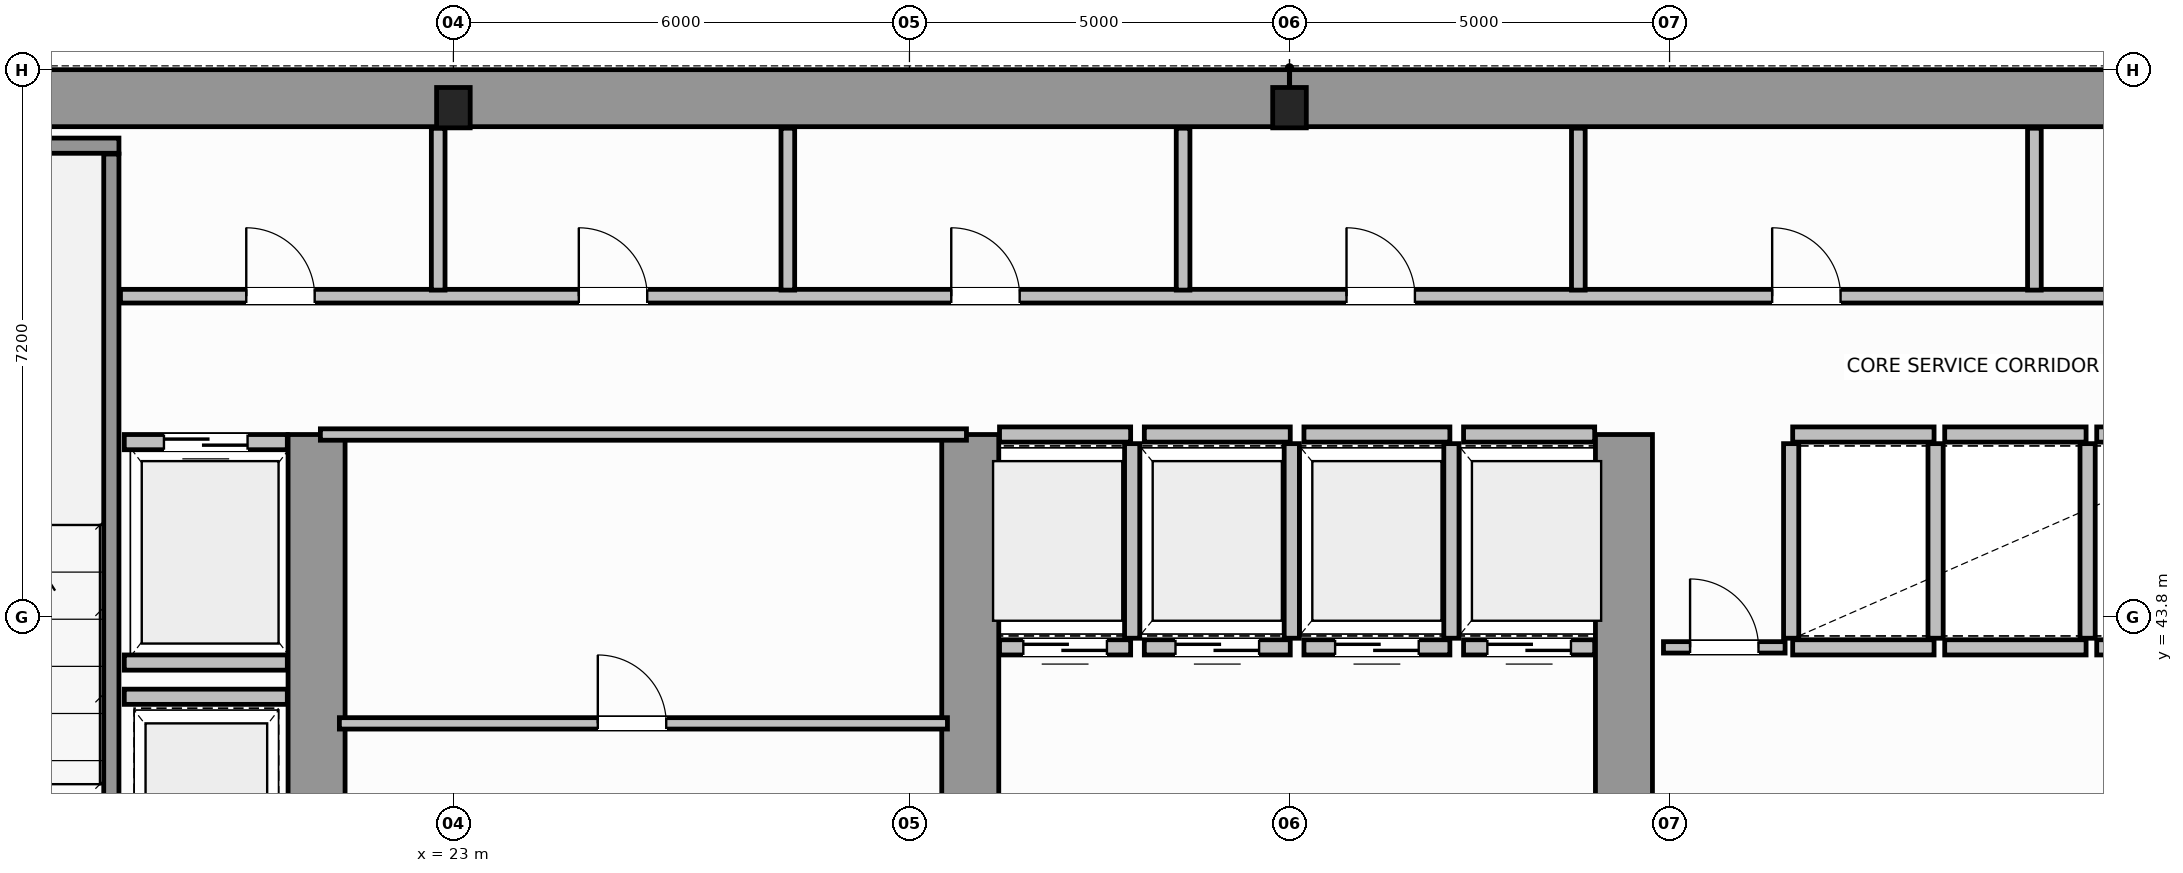
"""IFC4 building model, lengths in metres.
Left out: names, types, materials, properties, quantities, classifications, styles, units other than length and angle.
Written with IfcOpenShell. Run it as: python <this file> out.ifc"""

import sys

from ifc_helpers import new_model, si_unit, direction, frame, frame_2d, origin, origin_2d, place, context, subcontext, project, spatial, rectangle, i_section, extrude, source, transform, mapped, element, fill, save


model = new_model("IFC4")
c1 = context("Model", 3, precision=1e-05, world=origin(), true_north=direction((0.0, 1.0)))
c2 = subcontext(c1, "Body", "Model", "MODEL_VIEW")
j1 = project(units=[si_unit("LENGTHUNIT", "METRE"), si_unit("PLANEANGLEUNIT", "RADIAN")], contexts=[c1])
p1 = place(None, origin())
s1 = spatial("IfcSite", under=j1, at=p1, CompositionType="ELEMENT")
p2 = place(p1, origin())
s2 = spatial("IfcBuilding", under=s1, at=p2, CompositionType="ELEMENT")
p3 = place(p2, frame((0.0, 0.0, 126.2)))
s3 = spatial("IfcBuildingStorey", under=s2, at=p3, CompositionType="ELEMENT", Elevation=126.2)
m1 = source(origin(), c2, "Body", "SweptSolid", [
    extrude(i_section(OverallWidth=0.442, OverallDepth=0.531, WebThickness=0.065, FlangeThickness=0.076, FilletRadius=0.015, at=origin_2d()), origin(), (0.0, 0.0, 1.0), 3.8),
])
for number, where, z_axis, x_axis in (
    (1, (23.0, 50.5, 0.0), (0.0, 0.0, 1.0), (1.0, 0.0, 0.0)),
    (2, (34.0, 50.5, 0.0), (0.0, 0.0, 1.0), (1.0, 0.0, 0.0)),
):
    element("IfcColumn", number, at=place(p3, frame(where, z_axis=z_axis, x_axis=x_axis)), inside=s3, PredefinedType="COLUMN", context=c2, shape_type="MappedRepresentation", body=[
        mapped(m1, transform((0.0, 0.0, 0.0), scale=1.0)),
    ])
for number, where, z_axis, x_axis in (
    (3, (14.379, 50.625, 0.0), (0.0, 0.0, 1.0), (1.0, 0.0, 0.0)),
    (4, (34.002, 50.625, 0.0), (0.0, 0.0, 1.0), (1.0, 0.0, 0.0)),
):
    element("IfcWall", number, at=place(p3, frame(where, z_axis=z_axis, x_axis=x_axis)), inside=s3, PredefinedType="SHEAR", context=c2, shape_type="SweptSolid", body=[
        extrude(rectangle(XDim=19.619, YDim=0.75, at=frame_2d((9.81, 0.0))), origin(), (0.0, 0.0, 1.0), 3.8),
    ])
for number, where, z_axis, x_axis in (
    (5, (21.2, 36.895, 0.0), (0.0, 0.0, 1.0), (0.0, 1.0, 0.0)),
    (6, (29.8, 36.895, 0.0), (0.0, 0.0, 1.0), (0.0, 1.0, 0.0)),
    (7, (38.4, 36.895, 0.0), (0.0, 0.0, 1.0), (0.0, 1.0, 0.0)),
):
    element("IfcWall", number, at=place(p3, frame(where, z_axis=z_axis, x_axis=x_axis)), inside=s3, PredefinedType="SHEAR", context=c2, shape_type="SweptSolid", body=[
        extrude(rectangle(XDim=9.305, YDim=0.75, at=frame_2d((4.652, 0.0))), origin(), (0.0, 0.0, 1.0), 3.8),
    ])
p4 = place(p3, frame((14.375, 50.0, 0.0), z_axis=(0.0, 0.0, 1.0), x_axis=(1.0, 0.0, 0.0)))
e8 = element("IfcWall", 8, at=p4, inside=s3, PredefinedType="SOLIDWALL", context=c2, shape_type="SweptSolid", body=[
    extrude(rectangle(XDim=4.225, YDim=0.2, at=frame_2d((2.113, 0.0))), origin(), (0.0, 0.0, 1.0), 3.8),
])
p5 = place(p3, frame((18.5, 39.96, 0.0), z_axis=(0.0, 0.0, 1.0), x_axis=(0.0, 1.0, 0.0)))
e9 = element("IfcWall", 9, at=p5, inside=s3, PredefinedType="SOLIDWALL", context=c2, shape_type="SweptSolid", body=[
    extrude(rectangle(XDim=9.93, YDim=0.2, at=frame_2d((4.965, 0.0))), origin(), (0.0, 0.0, 1.0), 3.8),
])
p6 = place(p3, frame((30.185, 43.4, 0.0), z_axis=(0.0, 0.0, 1.0), x_axis=(1.0, 0.0, 0.0)))
e10 = element("IfcWall", 10, at=p6, inside=s3, PredefinedType="SOLIDWALL", context=c2, shape_type="SweptSolid", body=[
    extrude(rectangle(XDim=1.725, YDim=0.2, at=frame_2d((0.862, 0.0))), origin(), (0.0, 0.0, 1.0), 3.58),
])
p7 = place(p6, frame((0.313, 0.0, 0.0)))
e11 = element("IfcOpeningElement", 11, at=p7, cuts=e10, PredefinedType="OPENING", context=c2, shape_type="SweptSolid", body=[
    extrude(rectangle(XDim=1.1, YDim=2.15, at=frame_2d((0.55, 1.075))), frame((0.0, 0.11, 0.0), z_axis=(0.0, -1.0, 0.0), x_axis=(1.0, 0.0, 0.0)), (0.0, 0.0, 1.0), 0.22),
])
p8 = place(p3, frame((30.185, 46.2, 0.0), z_axis=(0.0, 0.0, 1.0), x_axis=(1.0, 0.0, 0.0)))
e12 = element("IfcWall", 12, at=p8, inside=s3, PredefinedType="SOLIDWALL", context=c2, shape_type="SweptSolid", body=[
    extrude(rectangle(XDim=1.725, YDim=0.2, at=frame_2d((0.862, 0.0))), origin(), (0.0, 0.0, 1.0), 3.58),
])
p9 = place(p3, frame((31.93, 43.52, 0.0), z_axis=(0.0, 0.0, 1.0), x_axis=(0.0, 1.0, 0.0)))
e13 = element("IfcWall", 13, at=p9, inside=s3, PredefinedType="SOLIDWALL", context=c2, shape_type="SweptSolid", body=[
    extrude(rectangle(XDim=2.56, YDim=0.2, at=frame_2d((1.28, 0.0))), origin(), (0.0, 0.0, 1.0), 3.58),
])
p10 = place(p3, frame((32.09, 43.4, 0.0), z_axis=(0.0, 0.0, 1.0), x_axis=(1.0, 0.0, 0.0)))
e14 = element("IfcWall", 14, at=p10, inside=s3, PredefinedType="SOLIDWALL", context=c2, shape_type="SweptSolid", body=[
    extrude(rectangle(XDim=1.92, YDim=0.2, at=frame_2d((0.96, 0.0))), origin(), (0.0, 0.0, 1.0), 3.58),
])
p11 = place(p10, frame((0.41, 0.0, 0.0)))
e15 = element("IfcOpeningElement", 15, at=p11, cuts=e14, PredefinedType="OPENING", context=c2, shape_type="SweptSolid", body=[
    extrude(rectangle(XDim=1.1, YDim=2.15, at=frame_2d((0.55, 1.075))), frame((0.0, 0.11, 0.0), z_axis=(0.0, -1.0, 0.0), x_axis=(1.0, 0.0, 0.0)), (0.0, 0.0, 1.0), 0.22),
])
p12 = place(p3, frame((32.09, 46.2, 0.0), z_axis=(0.0, 0.0, 1.0), x_axis=(1.0, 0.0, 0.0)))
e16 = element("IfcWall", 16, at=p12, inside=s3, PredefinedType="SOLIDWALL", context=c2, shape_type="SweptSolid", body=[
    extrude(rectangle(XDim=1.92, YDim=0.2, at=frame_2d((0.96, 0.0))), origin(), (0.0, 0.0, 1.0), 3.58),
])
p13 = place(p3, frame((34.03, 43.52, 0.0), z_axis=(0.0, 0.0, 1.0), x_axis=(0.0, 1.0, 0.0)))
e17 = element("IfcWall", 17, at=p13, inside=s3, PredefinedType="SOLIDWALL", context=c2, shape_type="SweptSolid", body=[
    extrude(rectangle(XDim=2.56, YDim=0.2, at=frame_2d((1.28, 0.0))), origin(), (0.0, 0.0, 1.0), 3.58),
])
p14 = place(p3, frame((34.19, 43.4, 0.0), z_axis=(0.0, 0.0, 1.0), x_axis=(1.0, 0.0, 0.0)))
e18 = element("IfcWall", 18, at=p14, inside=s3, PredefinedType="SOLIDWALL", context=c2, shape_type="SweptSolid", body=[
    extrude(rectangle(XDim=1.92, YDim=0.2, at=frame_2d((0.96, 0.0))), origin(), (0.0, 0.0, 1.0), 3.58),
])
p15 = place(p14, frame((0.41, 0.0, 0.0)))
e19 = element("IfcOpeningElement", 19, at=p15, cuts=e18, PredefinedType="OPENING", context=c2, shape_type="SweptSolid", body=[
    extrude(rectangle(XDim=1.1, YDim=2.15, at=frame_2d((0.55, 1.075))), frame((0.0, 0.11, 0.0), z_axis=(0.0, -1.0, 0.0), x_axis=(1.0, 0.0, 0.0)), (0.0, 0.0, 1.0), 0.22),
])
p16 = place(p3, frame((34.19, 46.2, 0.0), z_axis=(0.0, 0.0, 1.0), x_axis=(1.0, 0.0, 0.0)))
e20 = element("IfcWall", 20, at=p16, inside=s3, PredefinedType="SOLIDWALL", context=c2, shape_type="SweptSolid", body=[
    extrude(rectangle(XDim=1.92, YDim=0.2, at=frame_2d((0.96, 0.0))), origin(), (0.0, 0.0, 1.0), 3.58),
])
p17 = place(p3, frame((36.13, 43.52, 0.0), z_axis=(0.0, 0.0, 1.0), x_axis=(0.0, 1.0, 0.0)))
e21 = element("IfcWall", 21, at=p17, inside=s3, PredefinedType="SOLIDWALL", context=c2, shape_type="SweptSolid", body=[
    extrude(rectangle(XDim=2.56, YDim=0.2, at=frame_2d((1.28, 0.0))), origin(), (0.0, 0.0, 1.0), 3.58),
])
p18 = place(p3, frame((36.29, 43.4, 0.0), z_axis=(0.0, 0.0, 1.0), x_axis=(1.0, 0.0, 0.0)))
e22 = element("IfcWall", 22, at=p18, inside=s3, PredefinedType="SOLIDWALL", context=c2, shape_type="SweptSolid", body=[
    extrude(rectangle(XDim=1.725, YDim=0.2, at=frame_2d((0.862, 0.0))), origin(), (0.0, 0.0, 1.0), 3.58),
])
p19 = place(p18, frame((0.313, 0.0, 0.0)))
e23 = element("IfcOpeningElement", 23, at=p19, cuts=e22, PredefinedType="OPENING", context=c2, shape_type="SweptSolid", body=[
    extrude(rectangle(XDim=1.1, YDim=2.15, at=frame_2d((0.55, 1.075))), frame((0.0, 0.11, 0.0), z_axis=(0.0, -1.0, 0.0), x_axis=(1.0, 0.0, 0.0)), (0.0, 0.0, 1.0), 0.22),
])
p20 = place(p3, frame((36.29, 46.2, 0.0), z_axis=(0.0, 0.0, 1.0), x_axis=(1.0, 0.0, 0.0)))
e24 = element("IfcWall", 24, at=p20, inside=s3, PredefinedType="SOLIDWALL", context=c2, shape_type="SweptSolid", body=[
    extrude(rectangle(XDim=1.725, YDim=0.2, at=frame_2d((0.862, 0.0))), origin(), (0.0, 0.0, 1.0), 3.58),
])
for number, where, z_axis, x_axis in (
    (25, (40.62, 43.4, 0.0), (0.0, 0.0, 1.0), (1.0, 0.0, 0.0)),
    (26, (40.62, 46.2, 0.0), (0.0, 0.0, 1.0), (1.0, 0.0, 0.0)),
):
    element("IfcWall", number, at=place(p3, frame(where, z_axis=z_axis, x_axis=x_axis)), inside=s3, PredefinedType="SOLIDWALL", context=c2, shape_type="SweptSolid", body=[
        extrude(rectangle(XDim=1.86, YDim=0.2, at=frame_2d((0.93, 0.0))), origin(), (0.0, 0.0, 1.0), 3.58),
    ])
for number, where, z_axis, x_axis in (
    (27, (40.6, 43.52, 0.0), (0.0, 0.0, 1.0), (0.0, 1.0, 0.0)),
    (28, (42.5, 43.52, 0.0), (0.0, 0.0, 1.0), (0.0, 1.0, 0.0)),
):
    element("IfcWall", number, at=place(p3, frame(where, z_axis=z_axis, x_axis=x_axis)), inside=s3, PredefinedType="SOLIDWALL", context=c2, shape_type="SweptSolid", body=[
        extrude(rectangle(XDim=2.56, YDim=0.2, at=frame_2d((1.28, 0.0))), origin(), (0.0, 0.0, 1.0), 3.58),
    ])
for number, where, z_axis, x_axis in (
    (29, (42.62, 43.4, 0.0), (0.0, 0.0, 1.0), (1.0, 0.0, 0.0)),
    (30, (42.62, 46.2, 0.0), (0.0, 0.0, 1.0), (1.0, 0.0, 0.0)),
):
    element("IfcWall", number, at=place(p3, frame(where, z_axis=z_axis, x_axis=x_axis)), inside=s3, PredefinedType="SOLIDWALL", context=c2, shape_type="SweptSolid", body=[
        extrude(rectangle(XDim=1.86, YDim=0.2, at=frame_2d((0.93, 0.0))), origin(), (0.0, 0.0, 1.0), 3.58),
    ])
p21 = place(p3, frame((44.5, 43.52, 0.0), z_axis=(0.0, 0.0, 1.0), x_axis=(0.0, 1.0, 0.0)))
e31 = element("IfcWall", 31, at=p21, inside=s3, PredefinedType="SOLIDWALL", context=c2, shape_type="SweptSolid", body=[
    extrude(rectangle(XDim=2.56, YDim=0.2, at=frame_2d((1.28, 0.0))), origin(), (0.0, 0.0, 1.0), 3.58),
])
for number, where, z_axis, x_axis in (
    (32, (44.62, 43.4, 0.0), (0.0, 0.0, 1.0), (1.0, 0.0, 0.0)),
    (33, (44.62, 46.2, 0.0), (0.0, 0.0, 1.0), (1.0, 0.0, 0.0)),
):
    element("IfcWall", number, at=place(p3, frame(where, z_axis=z_axis, x_axis=x_axis)), inside=s3, PredefinedType="SOLIDWALL", context=c2, shape_type="SweptSolid", body=[
        extrude(rectangle(XDim=1.795, YDim=0.2, at=frame_2d((0.897, 0.0))), origin(), (0.0, 0.0, 1.0), 3.58),
    ])
p22 = place(p3, frame((18.67, 46.1, 0.0), z_axis=(0.0, 0.0, 1.0), x_axis=(1.0, 0.0, 0.0)))
e34 = element("IfcWall", 34, at=p22, inside=s3, PredefinedType="SOLIDWALL", context=c2, shape_type="SweptSolid", body=[
    extrude(rectangle(XDim=2.145, YDim=0.2, at=frame_2d((1.073, 0.0))), origin(), (0.0, 0.0, 1.0), 3.58),
])
p23 = place(p22, frame((0.522, 0.0, 0.0)))
e35 = element("IfcOpeningElement", 35, at=p23, cuts=e34, PredefinedType="OPENING", context=c2, shape_type="SweptSolid", body=[
    extrude(rectangle(XDim=1.1, YDim=2.15, at=frame_2d((0.55, 1.075))), frame((0.0, 0.11, 0.0), z_axis=(0.0, -1.0, 0.0), x_axis=(1.0, 0.0, 0.0)), (0.0, 0.0, 1.0), 0.22),
])
for number, where, z_axis, x_axis in (
    (36, (18.67, 43.2, 0.0), (0.0, 0.0, 1.0), (1.0, 0.0, 0.0)),
    (37, (18.67, 42.75, 0.0), (0.0, 0.0, 1.0), (1.0, 0.0, 0.0)),
):
    element("IfcWall", number, at=place(p3, frame(where, z_axis=z_axis, x_axis=x_axis)), inside=s3, PredefinedType="SOLIDWALL", context=c2, shape_type="SweptSolid", body=[
        extrude(rectangle(XDim=2.145, YDim=0.2, at=frame_2d((1.073, 0.0))), origin(), (0.0, 0.0, 1.0), 3.58),
    ])
p24 = place(p3, frame((21.25, 46.2, 0.0), z_axis=(0.0, 0.0, 1.0), x_axis=(1.0, 0.0, 0.0)))
e38 = element("IfcWall", 38, at=p24, inside=s3, PredefinedType="PARTITIONING", context=c2, shape_type="SweptSolid", body=[
    extrude(rectangle(XDim=8.5, YDim=0.15, at=frame_2d((4.25, 0.0))), origin(), (0.0, 0.0, 1.0), 3.58),
])
p25 = place(p3, frame((21.5, 42.4, 0.0), z_axis=(0.0, 0.0, 1.0), x_axis=(1.0, 0.0, 0.0)))
e39 = element("IfcWall", 39, at=p25, inside=s3, PredefinedType="PARTITIONING", context=c2, shape_type="SweptSolid", body=[
    extrude(rectangle(XDim=8.0, YDim=0.15, at=frame_2d((4.0, 0.0))), origin(), (0.0, 0.0, 1.0), 3.58),
])
p26 = place(p25, frame((3.4, 0.0, 0.0)))
e40 = element("IfcOpeningElement", 40, at=p26, cuts=e39, PredefinedType="OPENING", context=c2, shape_type="SweptSolid", body=[
    extrude(rectangle(XDim=0.9, YDim=2.1, at=frame_2d((0.45, 1.05))), frame((0.0, 0.085, 0.0), z_axis=(0.0, -1.0, 0.0), x_axis=(1.0, 0.0, 0.0)), (0.0, 0.0, 1.0), 0.17),
])
p27 = place(p3, frame((38.92, 43.4, 0.0), z_axis=(0.0, 0.0, 1.0), x_axis=(1.0, 0.0, 0.0)))
e41 = element("IfcWall", 41, at=p27, inside=s3, PredefinedType="PARTITIONING", context=c2, shape_type="SweptSolid", body=[
    extrude(rectangle(XDim=1.6, YDim=0.15, at=frame_2d((0.8, 0.0))), origin(), (0.0, 0.0, 1.0), 3.58),
])
p28 = place(p27, frame((0.35, 0.0, 0.0)))
e42 = element("IfcOpeningElement", 42, at=p28, cuts=e41, PredefinedType="OPENING", context=c2, shape_type="SweptSolid", body=[
    extrude(rectangle(XDim=0.9, YDim=2.1, at=frame_2d((0.45, 1.05))), frame((0.0, 0.085, 0.0), z_axis=(0.0, -1.0, 0.0), x_axis=(1.0, 0.0, 0.0)), (0.0, 0.0, 1.0), 0.17),
])
p29 = place(p3, frame((18.62, 48.02, 0.0), z_axis=(0.0, 0.0, 1.0), x_axis=(1.0, 0.0, 0.0)))
e43 = element("IfcWall", 43, at=p29, inside=s3, PredefinedType="PLUMBINGWALL", context=c2, shape_type="SweptSolid", body=[
    extrude(rectangle(XDim=30.76, YDim=0.18, at=frame_2d((15.38, 0.0))), origin(), (0.0, 0.0, 1.0), 3.58),
])
p30 = place(p29, frame((1.655, 0.0, 0.0)))
e44 = element("IfcOpeningElement", 44, at=p30, cuts=e43, PredefinedType="OPENING", context=c2, shape_type="SweptSolid", body=[
    extrude(rectangle(XDim=0.9, YDim=2.15, at=frame_2d((0.45, 1.075))), frame((0.0, 0.1, 0.0), z_axis=(0.0, -1.0, 0.0), x_axis=(1.0, 0.0, 0.0)), (0.0, 0.0, 1.0), 0.2),
])
p31 = place(p29, frame((6.03, 0.0, 0.0)))
e45 = element("IfcOpeningElement", 45, at=p31, cuts=e43, PredefinedType="OPENING", context=c2, shape_type="SweptSolid", body=[
    extrude(rectangle(XDim=0.9, YDim=2.15, at=frame_2d((0.45, 1.075))), frame((0.0, 0.1, 0.0), z_axis=(0.0, -1.0, 0.0), x_axis=(1.0, 0.0, 0.0)), (0.0, 0.0, 1.0), 0.2),
])
p32 = place(p29, frame((10.93, 0.0, 0.0)))
e46 = element("IfcOpeningElement", 46, at=p32, cuts=e43, PredefinedType="OPENING", context=c2, shape_type="SweptSolid", body=[
    extrude(rectangle(XDim=0.9, YDim=2.15, at=frame_2d((0.45, 1.075))), frame((0.0, 0.1, 0.0), z_axis=(0.0, -1.0, 0.0), x_axis=(1.0, 0.0, 0.0)), (0.0, 0.0, 1.0), 0.2),
])
p33 = place(p29, frame((16.13, 0.0, 0.0)))
e47 = element("IfcOpeningElement", 47, at=p33, cuts=e43, PredefinedType="OPENING", context=c2, shape_type="SweptSolid", body=[
    extrude(rectangle(XDim=0.9, YDim=2.15, at=frame_2d((0.45, 1.075))), frame((0.0, 0.1, 0.0), z_axis=(0.0, -1.0, 0.0), x_axis=(1.0, 0.0, 0.0)), (0.0, 0.0, 1.0), 0.2),
])
p34 = place(p29, frame((21.73, 0.0, 0.0)))
e48 = element("IfcOpeningElement", 48, at=p34, cuts=e43, PredefinedType="OPENING", context=c2, shape_type="SweptSolid", body=[
    extrude(rectangle(XDim=0.9, YDim=2.15, at=frame_2d((0.45, 1.075))), frame((0.0, 0.1, 0.0), z_axis=(0.0, -1.0, 0.0), x_axis=(1.0, 0.0, 0.0)), (0.0, 0.0, 1.0), 0.2),
])
p35 = place(p29, frame((27.505, 0.0, 0.0)))
e49 = element("IfcOpeningElement", 49, at=p35, cuts=e43, PredefinedType="OPENING", context=c2, shape_type="SweptSolid", body=[
    extrude(rectangle(XDim=0.9, YDim=2.15, at=frame_2d((0.45, 1.075))), frame((0.0, 0.1, 0.0), z_axis=(0.0, -1.0, 0.0), x_axis=(1.0, 0.0, 0.0)), (0.0, 0.0, 1.0), 0.2),
])
p36 = place(p3, frame((22.8, 48.1, 0.0), z_axis=(0.0, 0.0, 1.0), x_axis=(0.0, 1.0, 0.0)))
e50 = element("IfcWall", 50, at=p36, inside=s3, PredefinedType="PLUMBINGWALL", context=c2, shape_type="SweptSolid", body=[
    extrude(rectangle(XDim=2.13, YDim=0.18, at=frame_2d((1.065, 0.0))), origin(), (0.0, 0.0, 1.0), 2.87),
])
for number, where, z_axis, x_axis in (
    (51, (27.4, 48.1, 0.0), (0.0, 0.0, 1.0), (0.0, 1.0, 0.0)),
    (52, (32.6, 48.1, 0.0), (0.0, 0.0, 1.0), (0.0, 1.0, 0.0)),
    (53, (37.8, 48.1, 0.0), (0.0, 0.0, 1.0), (0.0, 1.0, 0.0)),
    (54, (43.8, 48.1, 0.0), (0.0, 0.0, 1.0), (0.0, 1.0, 0.0)),
):
    element("IfcWall", number, at=place(p3, frame(where, z_axis=z_axis, x_axis=x_axis)), inside=s3, PredefinedType="PLUMBINGWALL", context=c2, shape_type="SweptSolid", body=[
        extrude(rectangle(XDim=2.13, YDim=0.18, at=frame_2d((1.065, 0.0))), origin(), (0.0, 0.0, 1.0), 3.58),
    ])
m2 = source(origin(), c2, "Body", "SweptSolid", [
    extrude(rectangle(XDim=1.1, YDim=2.15, at=frame_2d((0.55, 1.075))), frame((0.0, 0.025, 0.0), z_axis=(0.0, -1.0, 0.0), x_axis=(1.0, 0.0, 0.0)), (0.0, 0.0, 1.0), 0.05),
])
p37 = place(p7, origin())
e55 = element("IfcDoor", 55, at=p37, inside=s3, OperationType="DOUBLE_DOOR_SLIDING", PredefinedType="DOOR", context=c2, shape_type="MappedRepresentation", body=[
    mapped(m2, transform((0.0, 0.0, 0.0), scale=1.0)),
])
fill(e11, e55)
p38 = place(p11, origin())
e56 = element("IfcDoor", 56, at=p38, inside=s3, OperationType="DOUBLE_DOOR_SLIDING", PredefinedType="DOOR", context=c2, shape_type="MappedRepresentation", body=[
    mapped(m2, transform((0.0, 0.0, 0.0), scale=1.0)),
])
fill(e15, e56)
p39 = place(p15, origin())
e57 = element("IfcDoor", 57, at=p39, inside=s3, OperationType="DOUBLE_DOOR_SLIDING", PredefinedType="DOOR", context=c2, shape_type="MappedRepresentation", body=[
    mapped(m2, transform((0.0, 0.0, 0.0), scale=1.0)),
])
fill(e19, e57)
p40 = place(p19, origin())
e58 = element("IfcDoor", 58, at=p40, inside=s3, OperationType="DOUBLE_DOOR_SLIDING", PredefinedType="DOOR", context=c2, shape_type="MappedRepresentation", body=[
    mapped(m2, transform((0.0, 0.0, 0.0), scale=1.0)),
])
fill(e23, e58)
p41 = place(p23, origin())
e59 = element("IfcDoor", 59, at=p41, inside=s3, OperationType="DOUBLE_DOOR_SLIDING", PredefinedType="DOOR", context=c2, shape_type="MappedRepresentation", body=[
    mapped(m2, transform((0.0, 0.0, 0.0), scale=1.0)),
])
fill(e35, e59)
m3 = source(origin(), c2, "Body", "SweptSolid", [
    extrude(rectangle(XDim=0.9, YDim=2.1, at=frame_2d((0.45, 1.05))), frame((0.0, 0.025, 0.0), z_axis=(0.0, -1.0, 0.0), x_axis=(1.0, 0.0, 0.0)), (0.0, 0.0, 1.0), 0.05),
])
p42 = place(p26, origin())
e60 = element("IfcDoor", 60, at=p42, inside=s3, OperationType="SINGLE_SWING_RIGHT", PredefinedType="DOOR", context=c2, shape_type="MappedRepresentation", body=[
    mapped(m3, transform((0.0, 0.0, 0.0), scale=1.0)),
])
fill(e40, e60)
p43 = place(p28, origin())
e61 = element("IfcDoor", 61, at=p43, inside=s3, OperationType="SINGLE_SWING_LEFT", PredefinedType="DOOR", context=c2, shape_type="MappedRepresentation", body=[
    mapped(m3, transform((0.0, 0.0, 0.0), scale=1.0)),
])
fill(e42, e61)
m4 = source(origin(), c2, "Body", "SweptSolid", [
    extrude(rectangle(XDim=0.9, YDim=2.15, at=frame_2d((0.45, 1.075))), frame((0.0, 0.025, 0.0), z_axis=(0.0, -1.0, 0.0), x_axis=(1.0, 0.0, 0.0)), (0.0, 0.0, 1.0), 0.05),
])
p44 = place(p30, origin())
e62 = element("IfcDoor", 62, at=p44, inside=s3, OperationType="SINGLE_SWING_LEFT", PredefinedType="DOOR", context=c2, shape_type="MappedRepresentation", body=[
    mapped(m4, transform((0.0, 0.0, 0.0), scale=1.0)),
])
fill(e44, e62)
p45 = place(p31, origin())
e63 = element("IfcDoor", 63, at=p45, inside=s3, OperationType="SINGLE_SWING_RIGHT", PredefinedType="DOOR", context=c2, shape_type="MappedRepresentation", body=[
    mapped(m4, transform((0.0, 0.0, 0.0), scale=1.0)),
])
fill(e45, e63)
p46 = place(p32, origin())
e64 = element("IfcDoor", 64, at=p46, inside=s3, OperationType="SINGLE_SWING_LEFT", PredefinedType="DOOR", context=c2, shape_type="MappedRepresentation", body=[
    mapped(m4, transform((0.0, 0.0, 0.0), scale=1.0)),
])
fill(e46, e64)
p47 = place(p33, origin())
e65 = element("IfcDoor", 65, at=p47, inside=s3, OperationType="SINGLE_SWING_RIGHT", PredefinedType="DOOR", context=c2, shape_type="MappedRepresentation", body=[
    mapped(m4, transform((0.0, 0.0, 0.0), scale=1.0)),
])
fill(e47, e65)
p48 = place(p34, origin())
e66 = element("IfcDoor", 66, at=p48, inside=s3, OperationType="SINGLE_SWING_LEFT", PredefinedType="DOOR", context=c2, shape_type="MappedRepresentation", body=[
    mapped(m4, transform((0.0, 0.0, 0.0), scale=1.0)),
])
fill(e48, e66)
save(model, sys.argv[1])
